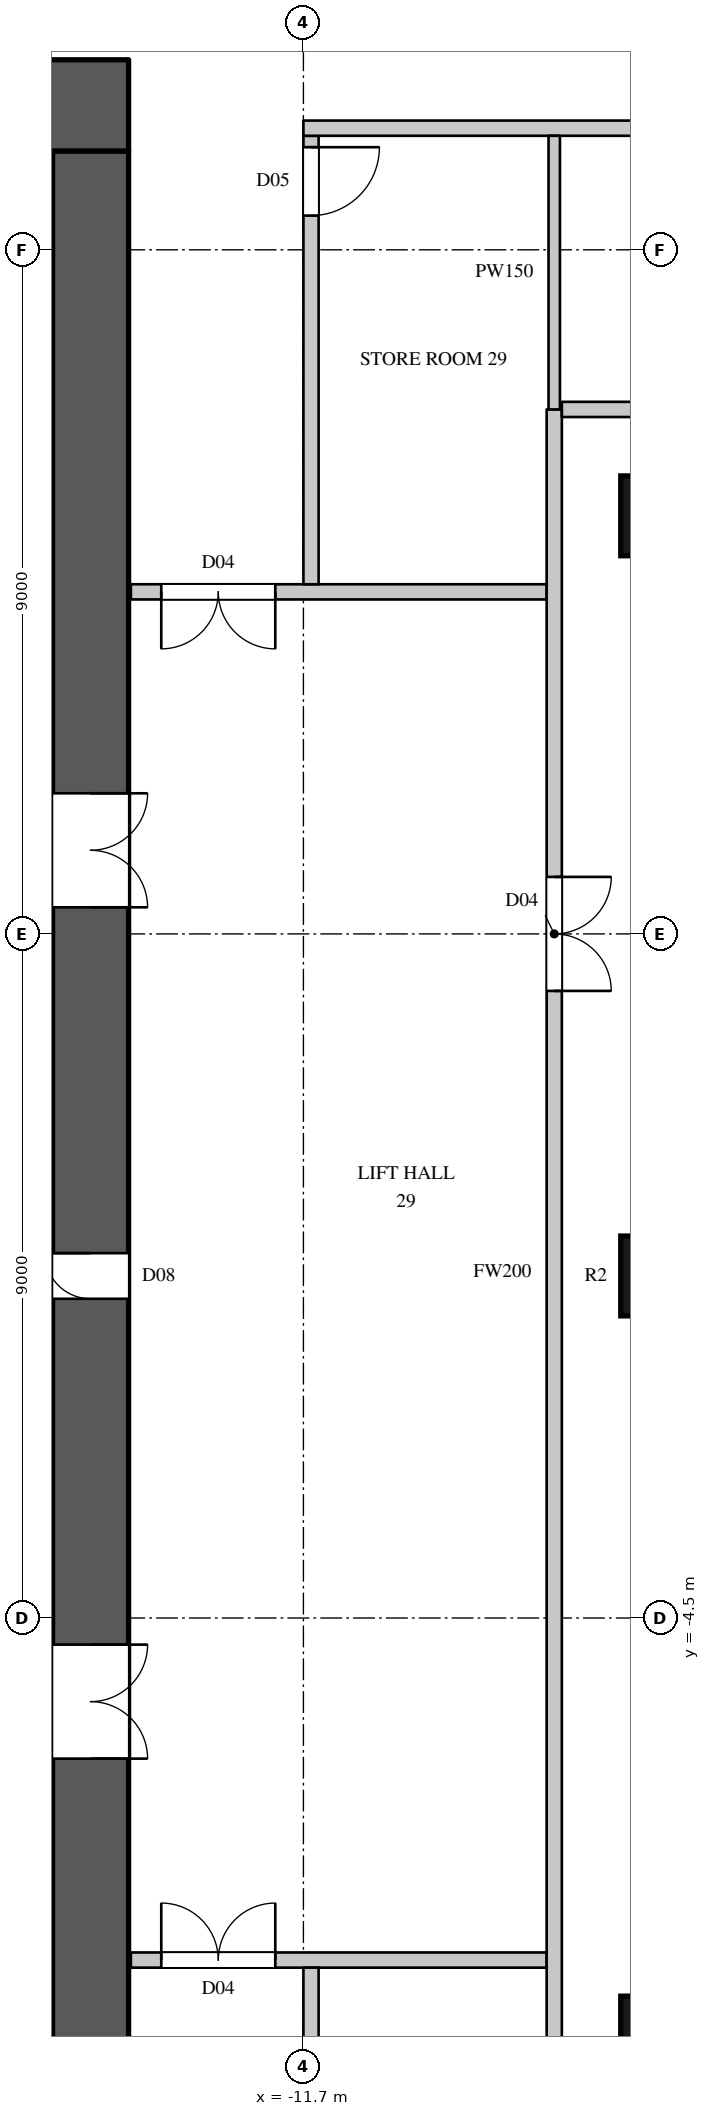
"""IFC4 building model, lengths in metres.
Left out: names, types, materials, properties, quantities, classifications, styles, units other than length and angle.
Written with IfcOpenShell. Run it as: python <this file> out.ifc"""

import sys

from ifc_helpers import new_model, si_unit, direction, frame, frame_2d, origin, origin_2d, place, context, subcontext, project, spatial, rectangle, circle, extrude, element, fill, save


model = new_model("IFC4")
c1 = context("Model", 3, precision=1e-05, world=origin(), true_north=direction((0.0, 1.0)))
c2 = subcontext(c1, "Body", "Model", "MODEL_VIEW")
j1 = project(units=[si_unit("LENGTHUNIT", "METRE"), si_unit("PLANEANGLEUNIT", "RADIAN")], contexts=[c1])
p1 = place(None, origin())
s1 = spatial("IfcSite", under=j1, at=p1, CompositionType="ELEMENT")
p2 = place(p1, origin())
s2 = spatial("IfcBuilding", under=s1, at=p2, CompositionType="ELEMENT")
p3 = place(p2, frame((0.0, 0.0, 134.7)))
s3 = spatial("IfcBuildingStorey", under=s2, at=p3, CompositionType="ELEMENT", Elevation=134.7)
for number, where, z_axis, x_axis in (
    (1, (-7.0, -10.0, 0.0), (0.0, 0.0, 1.0), (1.0, 0.0, 0.0)),
    (2, (-7.0, 0.0, 0.0), (0.0, 0.0, 1.0), (1.0, 0.0, 0.0)),
    (3, (-7.0, 10.0, 0.0), (0.0, 0.0, 1.0), (1.0, 0.0, 0.0)),
):
    element("IfcColumn", number, at=place(p3, frame(where, z_axis=z_axis, x_axis=x_axis)), inside=s3, PredefinedType="COLUMN", context=c2, shape_type="SweptSolid", body=[
        extrude(circle(Radius=0.525, at=origin_2d()), origin(), (0.0, 0.0, 1.0), 3.6),
    ])
p4 = place(p3, frame((-30.0, 15.4, 0.0), z_axis=(0.0, 0.0, 1.0), x_axis=(1.0, 0.0, 0.0)))
e4 = element("IfcWall", 4, at=p4, inside=s3, PredefinedType="SHEAR", context=c2, shape_type="SweptSolid", body=[
    extrude(rectangle(XDim=16.0, YDim=1.2, at=frame_2d((8.0, 0.0))), origin(), (0.0, 0.0, 1.0), 3.6),
])
p5 = place(p4, frame((13.4, 0.0, 0.0)))
e5 = element("IfcOpeningElement", 5, at=p5, cuts=e4, PredefinedType="OPENING", context=c2, shape_type="SweptSolid", body=[
    extrude(rectangle(XDim=1.5, YDim=2.4, at=frame_2d((0.75, 1.2))), frame((0.0, 0.61, 0.0), z_axis=(0.0, -1.0, 0.0), x_axis=(1.0, 0.0, 0.0)), (0.0, 0.0, 1.0), 1.22),
])
p6 = place(p3, frame((-14.5, -14.8, 0.0), z_axis=(0.0, 0.0, 1.0), x_axis=(0.0, 1.0, 0.0)))
e6 = element("IfcWall", 6, at=p6, inside=s3, PredefinedType="SHEAR", context=c2, shape_type="SweptSolid", body=[
    extrude(rectangle(XDim=29.6, YDim=1.0, at=frame_2d((14.8, 0.0))), origin(), (0.0, 0.0, 1.0), 3.6),
])
p7 = place(p6, frame((8.45, 0.0, 0.0)))
e7 = element("IfcOpeningElement", 7, at=p7, cuts=e6, PredefinedType="OPENING", context=c2, shape_type="SweptSolid", body=[
    extrude(rectangle(XDim=1.5, YDim=2.4, at=frame_2d((0.75, 1.2))), frame((0.0, 0.51, 0.0), z_axis=(0.0, -1.0, 0.0), x_axis=(1.0, 0.0, 0.0)), (0.0, 0.0, 1.0), 1.02),
])
p8 = place(p6, frame((19.65, 0.0, 0.0)))
e8 = element("IfcOpeningElement", 8, at=p8, cuts=e6, PredefinedType="OPENING", context=c2, shape_type="SweptSolid", body=[
    extrude(rectangle(XDim=1.5, YDim=2.4, at=frame_2d((0.75, 1.2))), frame((0.0, 0.51, 0.0), z_axis=(0.0, -1.0, 0.0), x_axis=(1.0, 0.0, 0.0)), (0.0, 0.0, 1.0), 1.02),
])
p9 = place(p6, frame((14.5, 0.0, 0.0)))
e9 = element("IfcOpeningElement", 9, at=p9, cuts=e6, PredefinedType="OPENING", context=c2, shape_type="SweptSolid", body=[
    extrude(rectangle(XDim=0.6, YDim=2.0, at=frame_2d((0.3, 1.0))), frame((0.0, 0.51, 0.0), z_axis=(0.0, -1.0, 0.0), x_axis=(1.0, 0.0, 0.0)), (0.0, 0.0, 1.0), 1.02),
])
p10 = place(p3, frame((-13.97, -9.0, 0.0), z_axis=(0.0, 0.0, 1.0), x_axis=(1.0, 0.0, 0.0)))
e10 = element("IfcWall", 10, at=p10, inside=s3, PredefinedType="PARTITIONING", context=c2, shape_type="SweptSolid", body=[
    extrude(rectangle(XDim=5.47, YDim=0.2, at=frame_2d((2.735, 0.0))), origin(), (0.0, 0.0, 1.0), 3.3),
])
p11 = place(p10, frame((0.4, 0.0, 0.0)))
e11 = element("IfcOpeningElement", 11, at=p11, cuts=e10, PredefinedType="OPENING", context=c2, shape_type="SweptSolid", body=[
    extrude(rectangle(XDim=1.5, YDim=2.2, at=frame_2d((0.75, 1.1))), frame((0.0, 0.11, 0.0), z_axis=(0.0, -1.0, 0.0), x_axis=(1.0, 0.0, 0.0)), (0.0, 0.0, 1.0), 0.22),
])
p12 = place(p3, frame((-13.97, 9.0, 0.0), z_axis=(0.0, 0.0, 1.0), x_axis=(1.0, 0.0, 0.0)))
e12 = element("IfcWall", 12, at=p12, inside=s3, PredefinedType="PARTITIONING", context=c2, shape_type="SweptSolid", body=[
    extrude(rectangle(XDim=5.47, YDim=0.2, at=frame_2d((2.735, 0.0))), origin(), (0.0, 0.0, 1.0), 3.3),
])
p13 = place(p12, frame((0.4, 0.0, 0.0)))
e13 = element("IfcOpeningElement", 13, at=p13, cuts=e12, PredefinedType="OPENING", context=c2, shape_type="SweptSolid", body=[
    extrude(rectangle(XDim=1.5, YDim=2.2, at=frame_2d((0.75, 1.1))), frame((0.0, 0.11, 0.0), z_axis=(0.0, -1.0, 0.0), x_axis=(1.0, 0.0, 0.0)), (0.0, 0.0, 1.0), 0.22),
])
p14 = place(p3, frame((-11.6, -15.0, 0.0), z_axis=(0.0, 0.0, 1.0), x_axis=(0.0, 1.0, 0.0)))
e14 = element("IfcWall", 14, at=p14, inside=s3, PredefinedType="PARTITIONING", context=c2, shape_type="SweptSolid", body=[
    extrude(rectangle(XDim=5.9, YDim=0.2, at=frame_2d((2.95, 0.0))), origin(), (0.0, 0.0, 1.0), 2.6),
])
p15 = place(p14, frame((0.15, 0.0, 0.0)))
e15 = element("IfcOpeningElement", 15, at=p15, cuts=e14, PredefinedType="OPENING", context=c2, shape_type="SweptSolid", body=[
    extrude(rectangle(XDim=0.9, YDim=2.2, at=frame_2d((0.45, 1.1))), frame((0.0, 0.11, 0.0), z_axis=(0.0, -1.0, 0.0), x_axis=(1.0, 0.0, 0.0)), (0.0, 0.0, 1.0), 0.22),
])
p16 = place(p3, frame((-11.6, 9.1, 0.0), z_axis=(0.0, 0.0, 1.0), x_axis=(0.0, 1.0, 0.0)))
e16 = element("IfcWall", 16, at=p16, inside=s3, PredefinedType="PARTITIONING", context=c2, shape_type="SweptSolid", body=[
    extrude(rectangle(XDim=5.9, YDim=0.2, at=frame_2d((2.95, 0.0))), origin(), (0.0, 0.0, 1.0), 2.6),
])
p17 = place(p16, frame((4.85, 0.0, 0.0)))
e17 = element("IfcOpeningElement", 17, at=p17, cuts=e16, PredefinedType="OPENING", context=c2, shape_type="SweptSolid", body=[
    extrude(rectangle(XDim=0.9, YDim=2.2, at=frame_2d((0.45, 1.1))), frame((0.0, 0.11, 0.0), z_axis=(0.0, -1.0, 0.0), x_axis=(1.0, 0.0, 0.0)), (0.0, 0.0, 1.0), 0.22),
])
p18 = place(p3, frame((-11.7, 15.1, 0.0), z_axis=(0.0, 0.0, 1.0), x_axis=(1.0, 0.0, 0.0)))
e18 = element("IfcWall", 18, at=p18, inside=s3, PredefinedType="PARTITIONING", context=c2, shape_type="SweptSolid", body=[
    extrude(rectangle(XDim=10.2, YDim=0.2, at=frame_2d((5.1, 0.0))), origin(), (0.0, 0.0, 1.0), 3.3),
])
p19 = place(p18, frame((5.9, 0.0, 0.0)))
e19 = element("IfcOpeningElement", 19, at=p19, cuts=e18, PredefinedType="OPENING", context=c2, shape_type="SweptSolid", body=[
    extrude(rectangle(XDim=1.6, YDim=2.4, at=frame_2d((0.8, 1.2))), frame((0.0, 0.11, 0.0), z_axis=(0.0, -1.0, 0.0), x_axis=(1.0, 0.0, 0.0)), (0.0, 0.0, 1.0), 0.22),
])
p20 = place(p3, frame((-8.4, -11.3, 0.0), z_axis=(0.0, 0.0, 1.0), x_axis=(0.0, 1.0, 0.0)))
e20 = element("IfcWall", 20, at=p20, inside=s3, PredefinedType="PARTITIONING", context=c2, shape_type="SweptSolid", body=[
    extrude(rectangle(XDim=22.7, YDim=0.2, at=frame_2d((11.35, 0.0))), origin(), (0.0, 0.0, 1.0), 3.3),
])
p21 = place(p20, frame((15.05, 0.0, 0.0)))
e21 = element("IfcOpeningElement", 21, at=p21, cuts=e20, PredefinedType="OPENING", context=c2, shape_type="SweptSolid", body=[
    extrude(rectangle(XDim=1.5, YDim=2.2, at=frame_2d((0.75, 1.1))), frame((0.0, 0.11, 0.0), z_axis=(0.0, -1.0, 0.0), x_axis=(1.0, 0.0, 0.0)), (0.0, 0.0, 1.0), 0.22),
])
p22 = place(p3, frame((-8.3, 11.4, 0.0), z_axis=(0.0, 0.0, 1.0), x_axis=(1.0, 0.0, 0.0)))
e22 = element("IfcWall", 22, at=p22, inside=s3, PredefinedType="PARTITIONING", context=c2, shape_type="SweptSolid", body=[
    extrude(rectangle(XDim=18.7, YDim=0.2, at=frame_2d((9.35, 0.0))), origin(), (0.0, 0.0, 1.0), 3.3),
])
p23 = place(p22, frame((6.9, 0.0, 0.0)))
e23 = element("IfcOpeningElement", 23, at=p23, cuts=e22, PredefinedType="OPENING", context=c2, shape_type="SweptSolid", body=[
    extrude(rectangle(XDim=1.5, YDim=2.2, at=frame_2d((0.75, 1.1))), frame((0.0, 0.11, 0.0), z_axis=(0.0, -1.0, 0.0), x_axis=(1.0, 0.0, 0.0)), (0.0, 0.0, 1.0), 0.22),
])
p24 = place(p3, frame((-8.4, 11.4, 0.0), z_axis=(0.0, 0.0, 1.0), x_axis=(0.0, 1.0, 0.0)))
e24 = element("IfcWall", 24, at=p24, inside=s3, PredefinedType="PARTITIONING", context=c2, shape_type="SweptSolid", body=[
    extrude(rectangle(XDim=3.6, YDim=0.15, at=frame_2d((1.8, 0.0))), origin(), (0.0, 0.0, 1.0), 3.3),
])
p25 = place(p21, origin())
e25 = element("IfcDoor", 25, at=p25, inside=s3, OperationType="DOUBLE_DOOR_SINGLE_SWING", PredefinedType="DOOR", context=c2, shape_type="SweptSolid", body=[
    extrude(rectangle(XDim=1.5, YDim=2.2, at=frame_2d((0.75, 1.1))), frame((0.0, 0.025, 0.0), z_axis=(0.0, -1.0, 0.0), x_axis=(1.0, 0.0, 0.0)), (0.0, 0.0, 1.0), 0.05),
])
fill(e21, e25)
p26 = place(p11, origin())
e26 = element("IfcDoor", 26, at=p26, inside=s3, OperationType="DOUBLE_DOOR_SINGLE_SWING", PredefinedType="DOOR", context=c2, shape_type="SweptSolid", body=[
    extrude(rectangle(XDim=1.5, YDim=2.2, at=frame_2d((0.75, 1.1))), frame((0.0, 0.025, 0.0), z_axis=(0.0, -1.0, 0.0), x_axis=(1.0, 0.0, 0.0)), (0.0, 0.0, 1.0), 0.05),
])
fill(e11, e26)
p27 = place(p13, origin())
e27 = element("IfcDoor", 27, at=p27, inside=s3, OperationType="DOUBLE_DOOR_SINGLE_SWING", PredefinedType="DOOR", context=c2, shape_type="SweptSolid", body=[
    extrude(rectangle(XDim=1.5, YDim=2.2, at=frame_2d((0.75, 1.1))), frame((0.0, 0.025, 0.0), z_axis=(0.0, -1.0, 0.0), x_axis=(1.0, 0.0, 0.0)), (0.0, 0.0, 1.0), 0.05),
])
fill(e13, e27)
p28 = place(p17, origin())
e28 = element("IfcDoor", 28, at=p28, inside=s3, OperationType="SINGLE_SWING_LEFT", PredefinedType="DOOR", context=c2, shape_type="SweptSolid", body=[
    extrude(rectangle(XDim=0.9, YDim=2.2, at=frame_2d((0.45, 1.1))), frame((0.0, 0.025, 0.0), z_axis=(0.0, -1.0, 0.0), x_axis=(1.0, 0.0, 0.0)), (0.0, 0.0, 1.0), 0.05),
])
fill(e17, e28)
p29 = place(p7, origin())
e29 = element("IfcDoor", 29, at=p29, inside=s3, OperationType="DOUBLE_DOOR_SINGLE_SWING", PredefinedType="DOOR", context=c2, shape_type="SweptSolid", body=[
    extrude(rectangle(XDim=1.5, YDim=2.4, at=frame_2d((0.75, 1.2))), frame((0.0, -0.445, 0.0), z_axis=(0.0, -1.0, 0.0), x_axis=(1.0, 0.0, 0.0)), (0.0, 0.0, 1.0), 0.05),
])
fill(e7, e29)
p30 = place(p8, origin())
e30 = element("IfcDoor", 30, at=p30, inside=s3, OperationType="DOUBLE_DOOR_SINGLE_SWING", PredefinedType="DOOR", context=c2, shape_type="SweptSolid", body=[
    extrude(rectangle(XDim=1.5, YDim=2.4, at=frame_2d((0.75, 1.2))), frame((0.0, -0.445, 0.0), z_axis=(0.0, -1.0, 0.0), x_axis=(1.0, 0.0, 0.0)), (0.0, 0.0, 1.0), 0.05),
])
fill(e8, e30)
p31 = place(p9, origin())
e31 = element("IfcDoor", 31, at=p31, inside=s3, OperationType="SINGLE_SWING_RIGHT", PredefinedType="DOOR", context=c2, shape_type="SweptSolid", body=[
    extrude(rectangle(XDim=0.6, YDim=2.0, at=frame_2d((0.3, 1.0))), frame((0.0, 0.495, 0.0), z_axis=(0.0, -1.0, 0.0), x_axis=(1.0, 0.0, 0.0)), (0.0, 0.0, 1.0), 0.05),
])
fill(e9, e31)
save(model, sys.argv[1])
